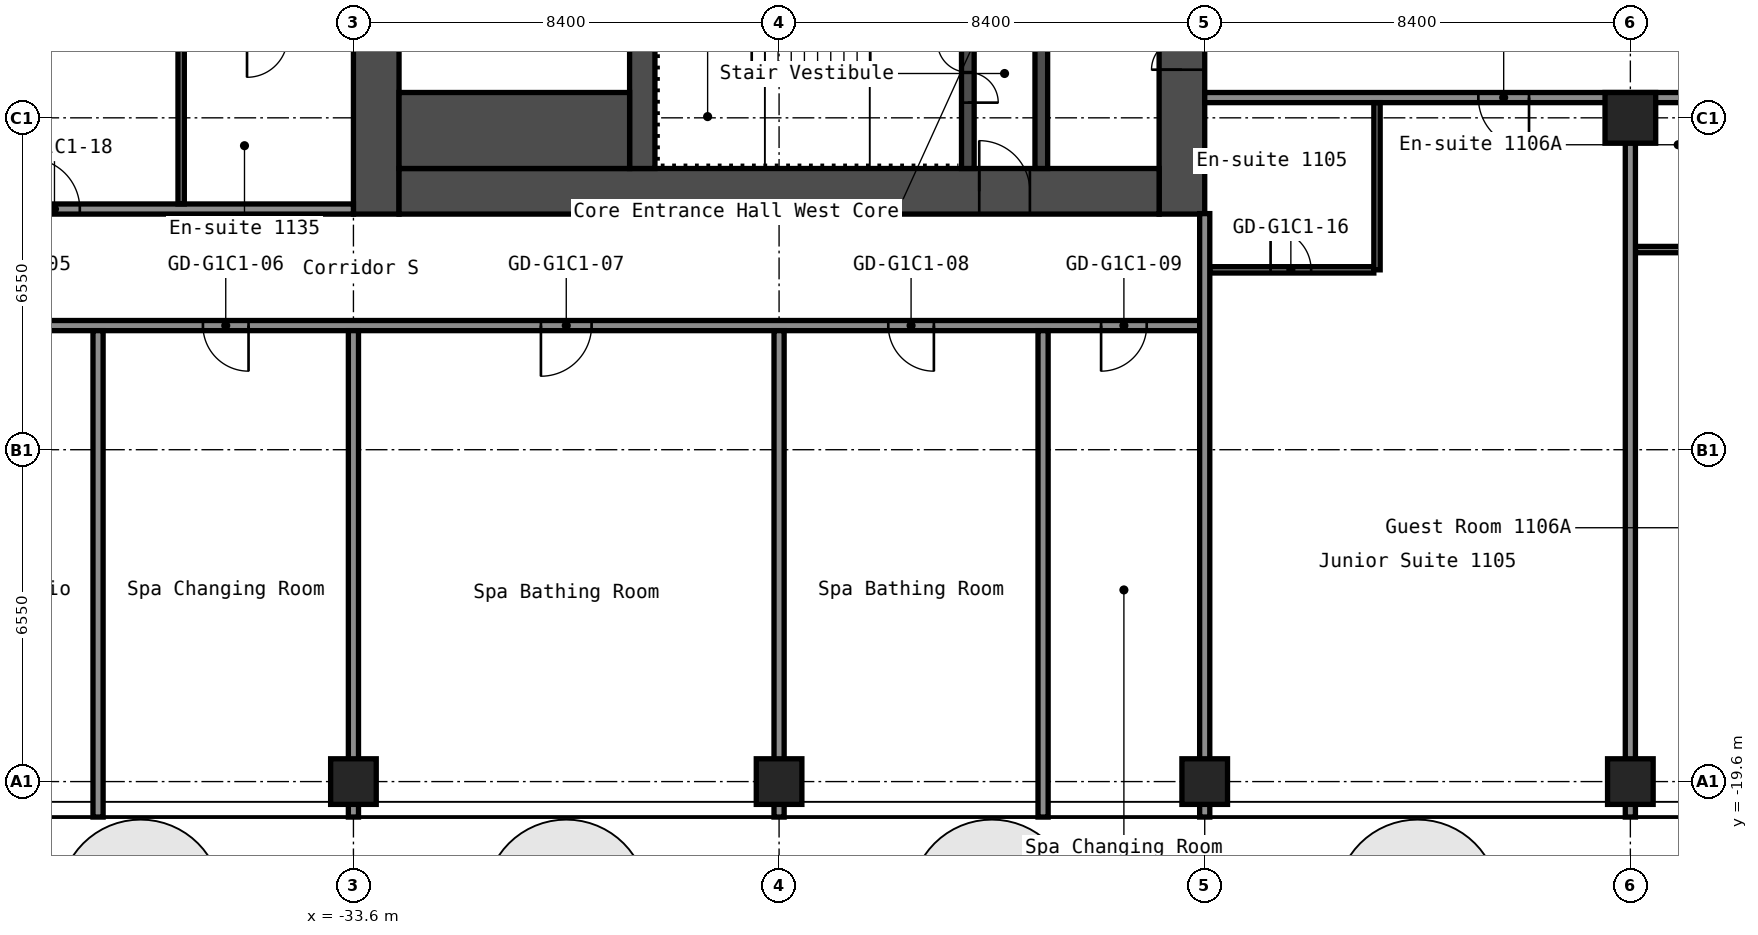
"""IFC4 building model, lengths in metres.
Left out: names, types, materials, properties, quantities, classifications, styles, units other than length and angle.
Written with IfcOpenShell. Run it as: python <this file> out.ifc"""

import sys

from ifc_helpers import new_model, si_unit, direction, frame, frame_2d, origin, origin_2d, place, context, subcontext, project, spatial, rectangle, hollow_rectangle, extrude, element, fill, save


model = new_model("IFC4")
c1 = context("Model", 3, precision=1e-05, world=origin(), true_north=direction((0.0, 1.0)))
c2 = subcontext(c1, "Body", "Model", "MODEL_VIEW")
j1 = project(units=[si_unit("LENGTHUNIT", "METRE"), si_unit("PLANEANGLEUNIT", "RADIAN")], contexts=[c1])
p1 = place(None, origin())
s1 = spatial("IfcSite", under=j1, at=p1, CompositionType="ELEMENT")
p2 = place(p1, origin())
s2 = spatial("IfcBuilding", under=s1, at=p2, CompositionType="ELEMENT")
p3 = place(p2, frame((0.0, 0.0, 42.2)))
s3 = spatial("IfcBuildingStorey", under=s2, at=p3, CompositionType="ELEMENT", Elevation=42.2)
for number, where, z_axis, x_axis in (
    (1, (-33.6, -19.6, 0.0), (0.0, 0.0, 1.0), (1.0, 0.0, 0.0)),
    (2, (-25.2, -19.6, 0.0), (0.0, 0.0, 1.0), (1.0, 0.0, 0.0)),
    (3, (-16.8, -19.6, 0.0), (0.0, 0.0, 1.0), (1.0, 0.0, 0.0)),
    (4, (-8.4, -19.6, 0.0), (0.0, 0.0, 1.0), (1.0, 0.0, 0.0)),
):
    element("IfcColumn", number, at=place(p3, frame(where, z_axis=z_axis, x_axis=x_axis)), inside=s3, PredefinedType="COLUMN", context=c2, shape_type="SweptSolid", body=[
        extrude(hollow_rectangle(XDim=0.9, YDim=0.9, WallThickness=0.036, at=origin_2d()), origin(), (0.0, 0.0, 1.0), 2.8),
    ])
p4 = place(p3, frame((-8.4, -6.5, 0.0), z_axis=(0.0, 0.0, 1.0), x_axis=(1.0, 0.0, 0.0)))
e5 = element("IfcColumn", 5, at=p4, inside=s3, PredefinedType="COLUMN", context=c2, shape_type="SweptSolid", body=[
    extrude(hollow_rectangle(XDim=1.0, YDim=1.0, WallThickness=0.04, at=origin_2d()), origin(), (0.0, 0.0, 1.0), 2.8),
])
p5 = place(p3, frame((-17.25, -8.4, 0.0), z_axis=(0.0, 0.0, 1.0), x_axis=(0.0, 1.0, 0.0)))
e6 = element("IfcWall", 6, at=p5, inside=s3, PredefinedType="SHEAR", context=c2, shape_type="SweptSolid", body=[
    extrude(rectangle(XDim=16.8, YDim=0.9, at=frame_2d((8.4, 0.0))), origin(), (0.0, 0.0, 1.0), 2.8),
])
p6 = place(p5, frame((12.75, 0.0, 0.0)))
e7 = element("IfcOpeningElement", 7, at=p6, cuts=e6, PredefinedType="OPENING", context=c2, shape_type="SweptSolid", body=[
    extrude(rectangle(XDim=1.2, YDim=2.1, at=frame_2d((0.6, 1.05))), frame((0.0, 0.46, 0.0), z_axis=(0.0, -1.0, 0.0), x_axis=(1.0, 0.0, 0.0)), (0.0, 0.0, 1.0), 0.92),
])
p7 = place(p5, frame((2.85, 0.0, 0.0)))
e8 = element("IfcOpeningElement", 8, at=p7, cuts=e6, PredefinedType="OPENING", context=c2, shape_type="SweptSolid", body=[
    extrude(rectangle(XDim=1.2, YDim=2.1, at=frame_2d((0.6, 1.05))), frame((0.0, 0.46, 0.0), z_axis=(0.0, -1.0, 0.0), x_axis=(1.0, 0.0, 0.0)), (0.0, 0.0, 1.0), 0.92),
])
p8 = place(p3, frame((-33.15, -8.4, 0.0), z_axis=(0.0, 0.0, 1.0), x_axis=(0.0, 1.0, 0.0)))
e9 = element("IfcWall", 9, at=p8, inside=s3, PredefinedType="SHEAR", context=c2, shape_type="SweptSolid", body=[
    extrude(rectangle(XDim=16.8, YDim=0.9, at=frame_2d((8.4, 0.0))), origin(), (0.0, 0.0, 1.0), 2.8),
])
p9 = place(p3, frame((-32.7, -7.95, 0.0), z_axis=(0.0, 0.0, 1.0), x_axis=(1.0, 0.0, 0.0)))
e10 = element("IfcWall", 10, at=p9, inside=s3, PredefinedType="SHEAR", context=c2, shape_type="SweptSolid", body=[
    extrude(rectangle(XDim=15.0, YDim=0.9, at=frame_2d((7.5, 0.0))), origin(), (0.0, 0.0, 1.0), 2.8),
])
p10 = place(p9, frame((11.45, 0.0, 0.0)))
e11 = element("IfcOpeningElement", 11, at=p10, cuts=e10, PredefinedType="OPENING", context=c2, shape_type="SweptSolid", body=[
    extrude(rectangle(XDim=1.0, YDim=2.1, at=frame_2d((0.5, 1.05))), frame((0.0, 0.46, 0.0), z_axis=(0.0, -1.0, 0.0), x_axis=(1.0, 0.0, 0.0)), (0.0, 0.0, 1.0), 0.92),
])
p11 = place(p3, frame((-20.025, -7.5, 0.0), z_axis=(0.0, 0.0, 1.0), x_axis=(0.0, 1.0, 0.0)))
e12 = element("IfcWall", 12, at=p11, inside=s3, PredefinedType="SHEAR", context=c2, shape_type="SweptSolid", body=[
    extrude(rectangle(XDim=6.3, YDim=0.25, at=frame_2d((3.15, 0.0))), origin(), (0.0, 0.0, 1.0), 2.8),
])
p12 = place(p11, frame((2.4, 0.0, 0.0)))
e13 = element("IfcOpeningElement", 13, at=p12, cuts=e12, PredefinedType="OPENING", context=c2, shape_type="SweptSolid", body=[
    extrude(rectangle(XDim=1.0, YDim=2.1, at=frame_2d((0.5, 1.05))), frame((0.0, 0.135, 0.0), z_axis=(0.0, -1.0, 0.0), x_axis=(1.0, 0.0, 0.0)), (0.0, 0.0, 1.0), 0.27),
])
p13 = place(p3, frame((-21.475, -7.5, 0.0), z_axis=(0.0, 0.0, 1.0), x_axis=(0.0, 1.0, 0.0)))
e14 = element("IfcWall", 14, at=p13, inside=s3, PredefinedType="SHEAR", context=c2, shape_type="SweptSolid", body=[
    extrude(rectangle(XDim=3.75, YDim=0.25, at=frame_2d((1.875, 0.0))), origin(), (0.0, 0.0, 1.0), 2.8),
])
p14 = place(p13, frame((1.3, 0.0, 0.0)))
e15 = element("IfcOpeningElement", 15, at=p14, cuts=e14, PredefinedType="OPENING", context=c2, shape_type="SweptSolid", body=[
    extrude(rectangle(XDim=1.2, YDim=2.1, at=frame_2d((0.6, 1.05))), frame((0.0, 0.135, 0.0), z_axis=(0.0, -1.0, 0.0), x_axis=(1.0, 0.0, 0.0)), (0.0, 0.0, 1.0), 0.27),
])
p15 = place(p3, frame((-27.9, -7.5, 0.0), z_axis=(0.0, 0.0, 1.0), x_axis=(0.0, 1.0, 0.0)))
e16 = element("IfcWall", 16, at=p15, inside=s3, PredefinedType="SHEAR", context=c2, shape_type="SweptSolid", body=[
    extrude(rectangle(XDim=3.75, YDim=0.5, at=frame_2d((1.875, 0.0))), origin(), (0.0, 0.0, 1.0), 2.8),
])
p16 = place(p3, frame((-32.7, -6.75, 0.0), z_axis=(0.0, 0.0, 1.0), x_axis=(1.0, 0.0, 0.0)))
e17 = element("IfcWall", 17, at=p16, inside=s3, PredefinedType="SHEAR", context=c2, shape_type="SweptSolid", body=[
    extrude(rectangle(XDim=4.55, YDim=1.5, at=frame_2d((2.275, 0.0))), origin(), (0.0, 0.0, 1.0), 2.8),
])
p17 = place(p3, frame((-51.1, -10.6, 0.0), z_axis=(0.0, 0.0, 1.0), x_axis=(1.0, 0.0, 0.0)))
e18 = element("IfcWall", 18, at=p17, inside=s3, PredefinedType="PARTITIONING", context=c2, shape_type="SweptSolid", body=[
    extrude(rectangle(XDim=34.3, YDim=0.2, at=frame_2d((17.15, 0.0))), origin(), (0.0, 0.0, 1.0), 2.8),
])
p18 = place(p17, frame((2.4, 0.0, 0.0)))
e19 = element("IfcOpeningElement", 19, at=p18, cuts=e18, PredefinedType="OPENING", context=c2, shape_type="SweptSolid", body=[
    extrude(rectangle(XDim=0.9, YDim=2.1, at=frame_2d((0.45, 1.05))), frame((0.0, 0.11, 0.0), z_axis=(0.0, -1.0, 0.0), x_axis=(1.0, 0.0, 0.0)), (0.0, 0.0, 1.0), 0.22),
])
p19 = place(p17, frame((6.8, 0.0, 0.0)))
e20 = element("IfcOpeningElement", 20, at=p19, cuts=e18, PredefinedType="OPENING", context=c2, shape_type="SweptSolid", body=[
    extrude(rectangle(XDim=0.9, YDim=2.1, at=frame_2d((0.45, 1.05))), frame((0.0, 0.11, 0.0), z_axis=(0.0, -1.0, 0.0), x_axis=(1.0, 0.0, 0.0)), (0.0, 0.0, 1.0), 0.22),
])
p20 = place(p17, frame((10.33, 0.0, 0.0)))
e21 = element("IfcOpeningElement", 21, at=p20, cuts=e18, PredefinedType="OPENING", context=c2, shape_type="SweptSolid", body=[
    extrude(rectangle(XDim=0.9, YDim=2.1, at=frame_2d((0.45, 1.05))), frame((0.0, 0.11, 0.0), z_axis=(0.0, -1.0, 0.0), x_axis=(1.0, 0.0, 0.0)), (0.0, 0.0, 1.0), 0.22),
])
p21 = place(p17, frame((14.53, 0.0, 0.0)))
e22 = element("IfcOpeningElement", 22, at=p21, cuts=e18, PredefinedType="OPENING", context=c2, shape_type="SweptSolid", body=[
    extrude(rectangle(XDim=0.9, YDim=2.1, at=frame_2d((0.45, 1.05))), frame((0.0, 0.11, 0.0), z_axis=(0.0, -1.0, 0.0), x_axis=(1.0, 0.0, 0.0)), (0.0, 0.0, 1.0), 0.22),
])
p22 = place(p17, frame((21.2, 0.0, 0.0)))
e23 = element("IfcOpeningElement", 23, at=p22, cuts=e18, PredefinedType="OPENING", context=c2, shape_type="SweptSolid", body=[
    extrude(rectangle(XDim=1.0, YDim=2.1, at=frame_2d((0.5, 1.05))), frame((0.0, 0.11, 0.0), z_axis=(0.0, -1.0, 0.0), x_axis=(1.0, 0.0, 0.0)), (0.0, 0.0, 1.0), 0.22),
])
p23 = place(p17, frame((28.055, 0.0, 0.0)))
e24 = element("IfcOpeningElement", 24, at=p23, cuts=e18, PredefinedType="OPENING", context=c2, shape_type="SweptSolid", body=[
    extrude(rectangle(XDim=0.9, YDim=2.1, at=frame_2d((0.45, 1.05))), frame((0.0, 0.11, 0.0), z_axis=(0.0, -1.0, 0.0), x_axis=(1.0, 0.0, 0.0)), (0.0, 0.0, 1.0), 0.22),
])
p24 = place(p17, frame((32.255, 0.0, 0.0)))
e25 = element("IfcOpeningElement", 25, at=p24, cuts=e18, PredefinedType="OPENING", context=c2, shape_type="SweptSolid", body=[
    extrude(rectangle(XDim=0.9, YDim=2.1, at=frame_2d((0.45, 1.05))), frame((0.0, 0.11, 0.0), z_axis=(0.0, -1.0, 0.0), x_axis=(1.0, 0.0, 0.0)), (0.0, 0.0, 1.0), 0.22),
])
p25 = place(p3, frame((-16.7, -9.5, 0.0), z_axis=(0.0, 0.0, 1.0), x_axis=(1.0, 0.0, 0.0)))
e26 = element("IfcWall", 26, at=p25, inside=s3, PredefinedType="PARTITIONING", context=c2, shape_type="SweptSolid", body=[
    extrude(rectangle(XDim=3.238, YDim=0.125, at=frame_2d((1.619, 0.0))), origin(), (0.0, 0.0, 1.0), 2.8),
])
p26 = place(p25, frame((1.2, 0.0, 0.0)))
e27 = element("IfcOpeningElement", 27, at=p26, cuts=e26, PredefinedType="OPENING", context=c2, shape_type="SweptSolid", body=[
    extrude(rectangle(XDim=0.8, YDim=2.1, at=frame_2d((0.4, 1.05))), frame((0.0, 0.073, 0.0), z_axis=(0.0, -1.0, 0.0), x_axis=(1.0, 0.0, 0.0)), (0.0, 0.0, 1.0), 0.145),
])
p27 = place(p3, frame((-8.3, -9.1, 0.0), z_axis=(0.0, 0.0, 1.0), x_axis=(1.0, 0.0, 0.0)))
e28 = element("IfcWall", 28, at=p27, inside=s3, PredefinedType="PARTITIONING", context=c2, shape_type="SweptSolid", body=[
    extrude(rectangle(XDim=2.338, YDim=0.125, at=frame_2d((1.169, 0.0))), origin(), (0.0, 0.0, 1.0), 2.8),
])
p28 = place(p3, frame((-48.6, -8.3, 0.0), z_axis=(0.0, 0.0, 1.0), x_axis=(1.0, 0.0, 0.0)))
e29 = element("IfcWall", 29, at=p28, inside=s3, PredefinedType="PARTITIONING", context=c2, shape_type="SweptSolid", body=[
    extrude(rectangle(XDim=15.0, YDim=0.2, at=frame_2d((7.5, 0.0))), origin(), (0.0, 0.0, 1.0), 2.8),
])
p29 = place(p28, frame((4.45, 0.0, 0.0)))
e30 = element("IfcOpeningElement", 30, at=p29, cuts=e29, PredefinedType="OPENING", context=c2, shape_type="SweptSolid", body=[
    extrude(rectangle(XDim=1.0, YDim=2.1, at=frame_2d((0.5, 1.05))), frame((0.0, 0.11, 0.0), z_axis=(0.0, -1.0, 0.0), x_axis=(1.0, 0.0, 0.0)), (0.0, 0.0, 1.0), 0.22),
])
p30 = place(p28, frame((8.6, 0.0, 0.0)))
e31 = element("IfcOpeningElement", 31, at=p30, cuts=e29, PredefinedType="OPENING", context=c2, shape_type="SweptSolid", body=[
    extrude(rectangle(XDim=1.0, YDim=2.1, at=frame_2d((0.5, 1.05))), frame((0.0, 0.11, 0.0), z_axis=(0.0, -1.0, 0.0), x_axis=(1.0, 0.0, 0.0)), (0.0, 0.0, 1.0), 0.22),
])
p31 = place(p3, frame((-16.8, -6.1, 0.0), z_axis=(0.0, 0.0, 1.0), x_axis=(1.0, 0.0, 0.0)))
e32 = element("IfcWall", 32, at=p31, inside=s3, PredefinedType="PARTITIONING", context=c2, shape_type="SweptSolid", body=[
    extrude(rectangle(XDim=33.6, YDim=0.2, at=frame_2d((16.8, 0.0))), origin(), (0.0, 0.0, 1.0), 2.8),
])
p32 = place(p31, frame((5.4, 0.0, 0.0)))
e33 = element("IfcOpeningElement", 33, at=p32, cuts=e32, PredefinedType="OPENING", context=c2, shape_type="SweptSolid", body=[
    extrude(rectangle(XDim=1.0, YDim=2.1, at=frame_2d((0.5, 1.05))), frame((0.0, 0.11, 0.0), z_axis=(0.0, -1.0, 0.0), x_axis=(1.0, 0.0, 0.0)), (0.0, 0.0, 1.0), 0.22),
])
p33 = place(p31, frame((11.25, 0.0, 0.0)))
e34 = element("IfcOpeningElement", 34, at=p33, cuts=e32, PredefinedType="OPENING", context=c2, shape_type="SweptSolid", body=[
    extrude(rectangle(XDim=1.0, YDim=2.1, at=frame_2d((0.5, 1.05))), frame((0.0, 0.11, 0.0), z_axis=(0.0, -1.0, 0.0), x_axis=(1.0, 0.0, 0.0)), (0.0, 0.0, 1.0), 0.22),
])
p34 = place(p31, frame((12.95, 0.0, 0.0)))
e35 = element("IfcOpeningElement", 35, at=p34, cuts=e32, PredefinedType="OPENING", context=c2, shape_type="SweptSolid", body=[
    extrude(rectangle(XDim=1.0, YDim=2.1, at=frame_2d((0.5, 1.05))), frame((0.0, 0.11, 0.0), z_axis=(0.0, -1.0, 0.0), x_axis=(1.0, 0.0, 0.0)), (0.0, 0.0, 1.0), 0.22),
])
p35 = place(p31, frame((18.115, 0.0, 0.0)))
e36 = element("IfcOpeningElement", 36, at=p35, cuts=e32, PredefinedType="OPENING", context=c2, shape_type="SweptSolid", body=[
    extrude(rectangle(XDim=0.9, YDim=2.1, at=frame_2d((0.45, 1.05))), frame((0.0, 0.11, 0.0), z_axis=(0.0, -1.0, 0.0), x_axis=(1.0, 0.0, 0.0)), (0.0, 0.0, 1.0), 0.22),
])
p36 = place(p31, frame((22.315, 0.0, 0.0)))
e37 = element("IfcOpeningElement", 37, at=p36, cuts=e32, PredefinedType="OPENING", context=c2, shape_type="SweptSolid", body=[
    extrude(rectangle(XDim=0.9, YDim=2.1, at=frame_2d((0.45, 1.05))), frame((0.0, 0.11, 0.0), z_axis=(0.0, -1.0, 0.0), x_axis=(1.0, 0.0, 0.0)), (0.0, 0.0, 1.0), 0.22),
])
p37 = place(p31, frame((28.05, 0.0, 0.0)))
e38 = element("IfcOpeningElement", 38, at=p37, cuts=e32, PredefinedType="OPENING", context=c2, shape_type="SweptSolid", body=[
    extrude(rectangle(XDim=1.0, YDim=2.1, at=frame_2d((0.5, 1.05))), frame((0.0, 0.11, 0.0), z_axis=(0.0, -1.0, 0.0), x_axis=(1.0, 0.0, 0.0)), (0.0, 0.0, 1.0), 0.22),
])
p38 = place(p31, frame((29.75, 0.0, 0.0)))
e39 = element("IfcOpeningElement", 39, at=p38, cuts=e32, PredefinedType="OPENING", context=c2, shape_type="SweptSolid", body=[
    extrude(rectangle(XDim=1.0, YDim=2.1, at=frame_2d((0.5, 1.05))), frame((0.0, 0.11, 0.0), z_axis=(0.0, -1.0, 0.0), x_axis=(1.0, 0.0, 0.0)), (0.0, 0.0, 1.0), 0.22),
])
p39 = place(p3, frame((-38.64, -20.3, 0.0), z_axis=(0.0, 0.0, 1.0), x_axis=(0.0, 1.0, 0.0)))
e40 = element("IfcWall", 40, at=p39, inside=s3, PredefinedType="PARTITIONING", context=c2, shape_type="SweptSolid", body=[
    extrude(rectangle(XDim=9.6, YDim=0.2, at=frame_2d((4.8, 0.0))), origin(), (0.0, 0.0, 1.0), 2.8),
])
p40 = place(p3, frame((-37.0, -8.2, 0.0), z_axis=(0.0, 0.0, 1.0), x_axis=(0.0, 1.0, 0.0)))
e41 = element("IfcWall", 41, at=p40, inside=s3, PredefinedType="PARTITIONING", context=c2, shape_type="SweptSolid", body=[
    extrude(rectangle(XDim=3.3, YDim=0.125, at=frame_2d((1.65, 0.0))), origin(), (0.0, 0.0, 1.0), 2.8),
])
for number, where, z_axis, x_axis in (
    (42, (-33.6, -20.3, 0.0), (0.0, 0.0, 1.0), (0.0, 1.0, 0.0)),
    (43, (-25.2, -20.3, 0.0), (0.0, 0.0, 1.0), (0.0, 1.0, 0.0)),
    (44, (-19.99, -20.3, 0.0), (0.0, 0.0, 1.0), (0.0, 1.0, 0.0)),
):
    element("IfcWall", number, at=place(p3, frame(where, z_axis=z_axis, x_axis=x_axis)), inside=s3, PredefinedType="PARTITIONING", context=c2, shape_type="SweptSolid", body=[
        extrude(rectangle(XDim=9.6, YDim=0.2, at=frame_2d((4.8, 0.0))), origin(), (0.0, 0.0, 1.0), 2.8),
    ])
p41 = place(p3, frame((-16.8, -20.3, 0.0), z_axis=(0.0, 0.0, 1.0), x_axis=(0.0, 1.0, 0.0)))
e45 = element("IfcWall", 45, at=p41, inside=s3, PredefinedType="PARTITIONING", context=c2, shape_type="SweptSolid", body=[
    extrude(rectangle(XDim=11.91, YDim=0.2, at=frame_2d((5.955, 0.0))), origin(), (0.0, 0.0, 1.0), 2.8),
])
p42 = place(p3, frame((-13.4, -9.5, 0.0), z_axis=(0.0, 0.0, 1.0), x_axis=(0.0, 1.0, 0.0)))
e46 = element("IfcWall", 46, at=p42, inside=s3, PredefinedType="PARTITIONING", context=c2, shape_type="SweptSolid", body=[
    extrude(rectangle(XDim=3.3, YDim=0.125, at=frame_2d((1.65, 0.0))), origin(), (0.0, 0.0, 1.0), 2.8),
])
p43 = place(p3, frame((-8.4, -20.3, 0.0), z_axis=(0.0, 0.0, 1.0), x_axis=(0.0, 1.0, 0.0)))
e47 = element("IfcWall", 47, at=p43, inside=s3, PredefinedType="PARTITIONING", context=c2, shape_type="SweptSolid", body=[
    extrude(rectangle(XDim=13.31, YDim=0.2, at=frame_2d((6.655, 0.0))), origin(), (0.0, 0.0, 1.0), 2.8),
])
p44 = place(p7, origin())
e48 = element("IfcDoor", 48, at=p44, inside=s3, OperationType="DOUBLE_DOOR_SINGLE_SWING", PredefinedType="DOOR", context=c2, shape_type="SweptSolid", body=[
    extrude(rectangle(XDim=1.2, YDim=2.1, at=frame_2d((0.6, 1.05))), frame((0.0, 0.025, 0.0), z_axis=(0.0, -1.0, 0.0), x_axis=(1.0, 0.0, 0.0)), (0.0, 0.0, 1.0), 0.05),
])
fill(e8, e48)
p45 = place(p10, origin())
e49 = element("IfcDoor", 49, at=p45, inside=s3, OperationType="SINGLE_SWING_RIGHT", PredefinedType="DOOR", context=c2, shape_type="SweptSolid", body=[
    extrude(rectangle(XDim=1.0, YDim=2.1, at=frame_2d((0.5, 1.05))), frame((0.0, 0.025, 0.0), z_axis=(0.0, -1.0, 0.0), x_axis=(1.0, 0.0, 0.0)), (0.0, 0.0, 1.0), 0.05),
])
fill(e11, e49)
p46 = place(p14, origin())
e50 = element("IfcDoor", 50, at=p46, inside=s3, OperationType="DOUBLE_DOOR_SINGLE_SWING", PredefinedType="DOOR", context=c2, shape_type="SweptSolid", body=[
    extrude(rectangle(XDim=1.2, YDim=2.1, at=frame_2d((0.6, 1.05))), frame((0.0, 0.025, 0.0), z_axis=(0.0, -1.0, 0.0), x_axis=(1.0, 0.0, 0.0)), (0.0, 0.0, 1.0), 0.05),
])
fill(e15, e50)
p47 = place(p21, origin())
e51 = element("IfcDoor", 51, at=p47, inside=s3, OperationType="SINGLE_SWING_RIGHT", PredefinedType="DOOR", context=c2, shape_type="SweptSolid", body=[
    extrude(rectangle(XDim=0.9, YDim=2.1, at=frame_2d((0.45, 1.05))), frame((0.0, 0.025, 0.0), z_axis=(0.0, -1.0, 0.0), x_axis=(1.0, 0.0, 0.0)), (0.0, 0.0, 1.0), 0.05),
])
fill(e22, e51)
p48 = place(p22, origin())
e52 = element("IfcDoor", 52, at=p48, inside=s3, OperationType="SINGLE_SWING_LEFT", PredefinedType="DOOR", context=c2, shape_type="SweptSolid", body=[
    extrude(rectangle(XDim=1.0, YDim=2.1, at=frame_2d((0.5, 1.05))), frame((0.0, 0.025, 0.0), z_axis=(0.0, -1.0, 0.0), x_axis=(1.0, 0.0, 0.0)), (0.0, 0.0, 1.0), 0.05),
])
fill(e23, e52)
p49 = place(p23, origin())
e53 = element("IfcDoor", 53, at=p49, inside=s3, OperationType="SINGLE_SWING_RIGHT", PredefinedType="DOOR", context=c2, shape_type="SweptSolid", body=[
    extrude(rectangle(XDim=0.9, YDim=2.1, at=frame_2d((0.45, 1.05))), frame((0.0, 0.025, 0.0), z_axis=(0.0, -1.0, 0.0), x_axis=(1.0, 0.0, 0.0)), (0.0, 0.0, 1.0), 0.05),
])
fill(e24, e53)
p50 = place(p24, origin())
e54 = element("IfcDoor", 54, at=p50, inside=s3, OperationType="SINGLE_SWING_LEFT", PredefinedType="DOOR", context=c2, shape_type="SweptSolid", body=[
    extrude(rectangle(XDim=0.9, YDim=2.1, at=frame_2d((0.45, 1.05))), frame((0.0, 0.025, 0.0), z_axis=(0.0, -1.0, 0.0), x_axis=(1.0, 0.0, 0.0)), (0.0, 0.0, 1.0), 0.05),
])
fill(e25, e54)
p51 = place(p26, origin())
e55 = element("IfcDoor", 55, at=p51, inside=s3, OperationType="SINGLE_SWING_RIGHT", PredefinedType="DOOR", context=c2, shape_type="SweptSolid", body=[
    extrude(rectangle(XDim=0.8, YDim=2.1, at=frame_2d((0.4, 1.05))), frame((0.0, 0.025, 0.0), z_axis=(0.0, -1.0, 0.0), x_axis=(1.0, 0.0, 0.0)), (0.0, 0.0, 1.0), 0.05),
])
fill(e27, e55)
p52 = place(p30, origin())
e56 = element("IfcDoor", 56, at=p52, inside=s3, OperationType="SINGLE_SWING_RIGHT", PredefinedType="DOOR", context=c2, shape_type="SweptSolid", body=[
    extrude(rectangle(XDim=1.0, YDim=2.1, at=frame_2d((0.5, 1.05))), frame((0.0, 0.025, 0.0), z_axis=(0.0, -1.0, 0.0), x_axis=(1.0, 0.0, 0.0)), (0.0, 0.0, 1.0), 0.05),
])
fill(e31, e56)
p53 = place(p32, origin())
e57 = element("IfcDoor", 57, at=p53, inside=s3, OperationType="SINGLE_SWING_RIGHT", PredefinedType="DOOR", context=c2, shape_type="SweptSolid", body=[
    extrude(rectangle(XDim=1.0, YDim=2.1, at=frame_2d((0.5, 1.05))), frame((0.0, 0.025, 0.0), z_axis=(0.0, -1.0, 0.0), x_axis=(1.0, 0.0, 0.0)), (0.0, 0.0, 1.0), 0.05),
])
fill(e33, e57)
save(model, sys.argv[1])
